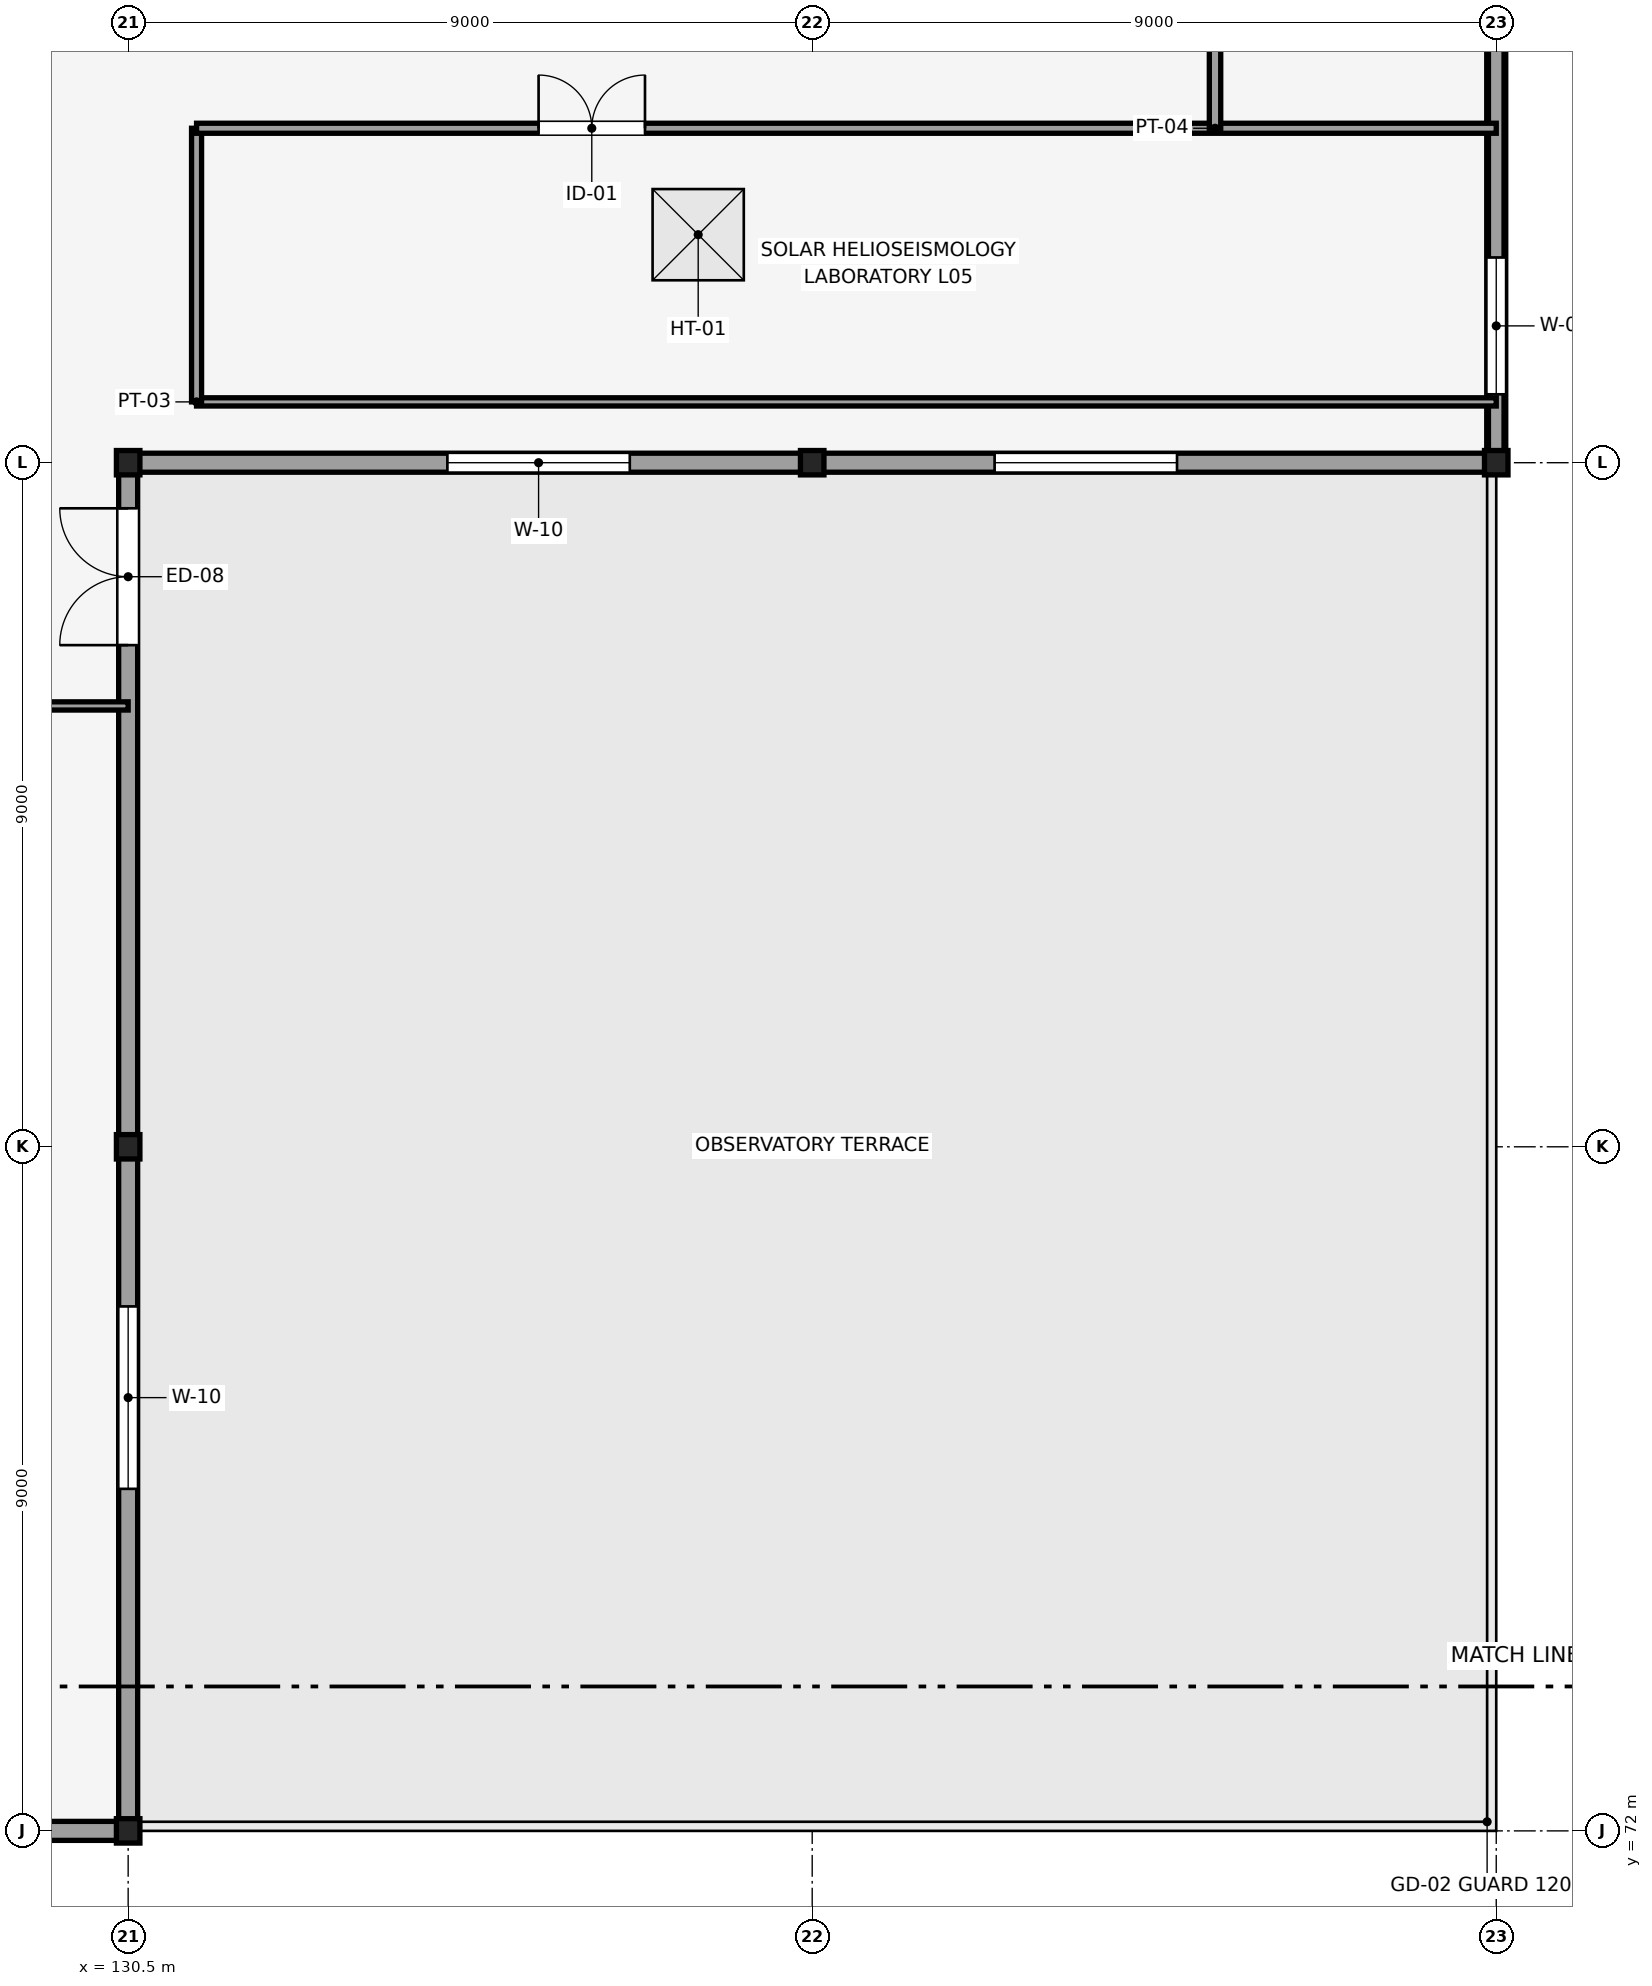
"""IFC4 building model, lengths in metres.
Left out: names, types, materials, properties, quantities, classifications, styles, units other than length and angle.
Written with IfcOpenShell. Run it as: python <this file> out.ifc"""

import sys

from ifc_helpers import new_model, si_unit, direction, frame, frame_2d, origin, origin_2d, place, context, subcontext, project, spatial, rectangle, i_section, extrude, element, fill, save


model = new_model("IFC4")
c1 = context("Model", 3, precision=1e-05, world=origin(), true_north=direction((0.0, 1.0)))
c2 = subcontext(c1, "Body", "Model", "MODEL_VIEW")
j1 = project(units=[si_unit("LENGTHUNIT", "METRE"), si_unit("PLANEANGLEUNIT", "RADIAN")], contexts=[c1])
p1 = place(None, origin())
s1 = spatial("IfcSite", under=j1, at=p1, CompositionType="ELEMENT")
p2 = place(p1, origin())
s2 = spatial("IfcBuilding", under=s1, at=p2, CompositionType="ELEMENT")
p3 = place(p2, frame((0.0, 0.0, 23.4)))
s3 = spatial("IfcBuildingStorey", under=s2, at=p3, CompositionType="ELEMENT", Elevation=23.4)
for number, where, z_axis, x_axis in (
    (1, (130.5, 72.0, 0.0), (0.0, 0.0, 1.0), (1.0, 0.0, 0.0)),
    (2, (130.5, 81.0, 0.0), (0.0, 0.0, 1.0), (1.0, 0.0, 0.0)),
    (3, (130.5, 90.0, 0.0), (0.0, 0.0, 1.0), (1.0, 0.0, 0.0)),
    (4, (139.5, 90.0, 0.0), (0.0, 0.0, 1.0), (1.0, 0.0, 0.0)),
    (5, (148.5, 90.0, 0.0), (0.0, 0.0, 1.0), (1.0, 0.0, 0.0)),
):
    element("IfcColumn", number, at=place(p3, frame(where, z_axis=z_axis, x_axis=x_axis)), inside=s3, PredefinedType="COLUMN", context=c2, shape_type="SweptSolid", body=[
        extrude(i_section(OverallWidth=0.309, OverallDepth=0.321, WebThickness=0.014, FlangeThickness=0.022, FilletRadius=0.017, at=origin_2d()), origin(), (0.0, 0.0, 1.0), 2.55),
    ])
p4 = place(p3, frame((121.5, 72.0, 0.0), z_axis=(0.0, 0.0, 1.0), x_axis=(1.0, 0.0, 0.0)))
e6 = element("IfcWall", 6, at=p4, inside=s3, PredefinedType="STANDARD", context=c2, shape_type="SweptSolid", body=[
    extrude(rectangle(XDim=9.0, YDim=0.25, at=frame_2d((4.5, 0.0))), origin(), (0.0, 0.0, 1.0), 2.114),
])
p5 = place(p4, frame((3.3, 0.0, 0.35)))
e7 = element("IfcOpeningElement", 7, at=p5, cuts=e6, PredefinedType="OPENING", context=c2, shape_type="SweptSolid", body=[
    extrude(rectangle(XDim=2.4, YDim=1.5, at=frame_2d((1.2, 0.75))), frame((0.0, 0.135, 0.0), z_axis=(0.0, -1.0, 0.0), x_axis=(1.0, 0.0, 0.0)), (0.0, 0.0, 1.0), 0.27),
])
p6 = place(p3, frame((130.5, 72.0, 0.0), z_axis=(0.0, 0.0, 1.0), x_axis=(0.0, 1.0, 0.0)))
e8 = element("IfcWall", 8, at=p6, inside=s3, PredefinedType="STANDARD", context=c2, shape_type="SweptSolid", body=[
    extrude(rectangle(XDim=18.0, YDim=0.25, at=frame_2d((9.0, 0.0))), origin(), (0.0, 0.0, 1.0), 2.114),
])
p7 = place(p6, frame((4.5, 0.0, 0.25)))
e9 = element("IfcOpeningElement", 9, at=p7, cuts=e8, PredefinedType="OPENING", context=c2, shape_type="SweptSolid", body=[
    extrude(rectangle(XDim=2.4, YDim=1.5, at=frame_2d((1.2, 0.75))), frame((0.0, 0.135, 0.0), z_axis=(0.0, -1.0, 0.0), x_axis=(1.0, 0.0, 0.0)), (0.0, 0.0, 1.0), 0.27),
])
p8 = place(p6, frame((15.6, 0.0, 0.0)))
e10 = element("IfcOpeningElement", 10, at=p8, cuts=e8, PredefinedType="OPENING", context=c2, shape_type="SweptSolid", body=[
    extrude(rectangle(XDim=1.8, YDim=2.05, at=frame_2d((0.9, 1.025))), frame((0.0, 0.135, 0.0), z_axis=(0.0, -1.0, 0.0), x_axis=(1.0, 0.0, 0.0)), (0.0, 0.0, 1.0), 0.27),
])
p9 = place(p3, frame((130.5, 90.0, 0.0), z_axis=(0.0, 0.0, 1.0), x_axis=(1.0, 0.0, 0.0)))
e11 = element("IfcWall", 11, at=p9, inside=s3, PredefinedType="STANDARD", context=c2, shape_type="SweptSolid", body=[
    extrude(rectangle(XDim=18.0, YDim=0.25, at=frame_2d((9.0, 0.0))), origin(), (0.0, 0.0, 1.0), 2.114),
])
p10 = place(p9, frame((4.2, 0.0, 0.35)))
e12 = element("IfcOpeningElement", 12, at=p10, cuts=e11, PredefinedType="OPENING", context=c2, shape_type="SweptSolid", body=[
    extrude(rectangle(XDim=2.4, YDim=1.5, at=frame_2d((1.2, 0.75))), frame((0.0, 0.135, 0.0), z_axis=(0.0, -1.0, 0.0), x_axis=(1.0, 0.0, 0.0)), (0.0, 0.0, 1.0), 0.27),
])
p11 = place(p9, frame((11.4, 0.0, 0.35)))
e13 = element("IfcOpeningElement", 13, at=p11, cuts=e11, PredefinedType="OPENING", context=c2, shape_type="SweptSolid", body=[
    extrude(rectangle(XDim=2.4, YDim=1.5, at=frame_2d((1.2, 0.75))), frame((0.0, 0.135, 0.0), z_axis=(0.0, -1.0, 0.0), x_axis=(1.0, 0.0, 0.0)), (0.0, 0.0, 1.0), 0.27),
])
p12 = place(p3, frame((148.5, 90.0, 0.0), z_axis=(0.0, 0.0, 1.0), x_axis=(0.0, 1.0, 0.0)))
e14 = element("IfcWall", 14, at=p12, inside=s3, PredefinedType="STANDARD", context=c2, shape_type="SweptSolid", body=[
    extrude(rectangle(XDim=9.0, YDim=0.25, at=frame_2d((4.5, 0.0))), origin(), (0.0, 0.0, 1.0), 2.114),
])
p13 = place(p12, frame((0.9, 0.0, 0.35)))
e15 = element("IfcOpeningElement", 15, at=p13, cuts=e14, PredefinedType="OPENING", context=c2, shape_type="SweptSolid", body=[
    extrude(rectangle(XDim=1.8, YDim=1.5, at=frame_2d((0.9, 0.75))), frame((0.0, 0.135, 0.0), z_axis=(0.0, -1.0, 0.0), x_axis=(1.0, 0.0, 0.0)), (0.0, 0.0, 1.0), 0.27),
])
p14 = place(p3, frame((148.5, 90.0, 2.55), z_axis=(0.0, 0.0, 1.0), x_axis=(0.0, 1.0, 0.0)))
e16 = element("IfcWall", 16, at=p14, inside=s3, PredefinedType="PARAPET", context=c2, shape_type="SweptSolid", body=[
    extrude(rectangle(XDim=18.0, YDim=0.205, at=frame_2d((9.0, 0.0))), origin(), (0.0, 0.0, 1.0), 0.4),
])
p15 = place(p3, frame((124.6, 86.8, 0.0), z_axis=(0.0, 0.0, 1.0), x_axis=(1.0, 0.0, 0.0)))
e17 = element("IfcWall", 17, at=p15, inside=s3, PredefinedType="PARTITIONING", context=c2, shape_type="SweptSolid", body=[
    extrude(rectangle(XDim=5.9, YDim=0.108, at=frame_2d((2.95, 0.0))), origin(), (0.0, 0.0, 1.0), 2.24),
])
p16 = place(p15, frame((1.95, 0.0, 0.0)))
e18 = element("IfcOpeningElement", 18, at=p16, cuts=e17, PredefinedType="OPENING", context=c2, shape_type="SweptSolid", body=[
    extrude(rectangle(XDim=2.0, YDim=2.4, at=frame_2d((1.0, 1.2))), frame((0.0, 0.064, 0.0), z_axis=(0.0, -1.0, 0.0), x_axis=(1.0, 0.0, 0.0)), (0.0, 0.0, 1.0), 0.128),
])
p17 = place(p3, frame((131.4, 90.8, 0.0), z_axis=(0.0, 0.0, 1.0), x_axis=(1.0, 0.0, 0.0)))
e19 = element("IfcWall", 19, at=p17, inside=s3, PredefinedType="PARTITIONING", context=c2, shape_type="SweptSolid", body=[
    extrude(rectangle(XDim=17.1, YDim=0.108, at=frame_2d((8.55, 0.0))), origin(), (0.0, 0.0, 1.0), 2.24),
])
p18 = place(p3, frame((131.4, 90.8, 0.0), z_axis=(0.0, 0.0, 1.0), x_axis=(0.0, 1.0, 0.0)))
e20 = element("IfcWall", 20, at=p18, inside=s3, PredefinedType="PARTITIONING", context=c2, shape_type="SweptSolid", body=[
    extrude(rectangle(XDim=3.6, YDim=0.132, at=frame_2d((1.8, 0.0))), origin(), (0.0, 0.0, 1.0), 2.24),
])
p19 = place(p3, frame((131.4, 94.4, 0.0), z_axis=(0.0, 0.0, 1.0), x_axis=(1.0, 0.0, 0.0)))
e21 = element("IfcWall", 21, at=p19, inside=s3, PredefinedType="PARTITIONING", context=c2, shape_type="SweptSolid", body=[
    extrude(rectangle(XDim=17.1, YDim=0.132, at=frame_2d((8.55, 0.0))), origin(), (0.0, 0.0, 1.0), 2.24),
])
p20 = place(p19, frame((4.5, 0.0, 0.0)))
e22 = element("IfcOpeningElement", 22, at=p20, cuts=e21, PredefinedType="OPENING", context=c2, shape_type="SweptSolid", body=[
    extrude(rectangle(XDim=1.4, YDim=2.2, at=frame_2d((0.7, 1.1))), frame((0.0, 0.076, 0.0), z_axis=(0.0, -1.0, 0.0), x_axis=(1.0, 0.0, 0.0)), (0.0, 0.0, 1.0), 0.152),
])
p21 = place(p3, frame((144.8, 94.4, 0.0), z_axis=(0.0, 0.0, 1.0), x_axis=(0.0, 1.0, 0.0)))
e23 = element("IfcWall", 23, at=p21, inside=s3, PredefinedType="PARTITIONING", context=c2, shape_type="SweptSolid", body=[
    extrude(rectangle(XDim=2.2, YDim=0.15, at=frame_2d((1.1, 0.0))), origin(), (0.0, 0.0, 1.0), 2.24),
])
p22 = place(p7, origin())
e24 = element("IfcWindow", 24, at=p22, inside=s3, PartitioningType="SINGLE_PANEL", PredefinedType="WINDOW", context=c2, shape_type="SweptSolid", body=[
    extrude(rectangle(XDim=2.4, YDim=1.5, at=frame_2d((1.2, 0.75))), frame((0.0, 0.03, 0.0), z_axis=(0.0, -1.0, 0.0), x_axis=(1.0, 0.0, 0.0)), (0.0, 0.0, 1.0), 0.06),
])
fill(e9, e24)
p23 = place(p8, origin())
e25 = element("IfcDoor", 25, at=p23, inside=s3, OperationType="DOUBLE_DOOR_SINGLE_SWING", PredefinedType="DOOR", context=c2, shape_type="SweptSolid", body=[
    extrude(rectangle(XDim=1.8, YDim=2.05, at=frame_2d((0.9, 1.025))), frame((0.0, 0.025, 0.0), z_axis=(0.0, -1.0, 0.0), x_axis=(1.0, 0.0, 0.0)), (0.0, 0.0, 1.0), 0.05),
])
fill(e10, e25)
p24 = place(p10, origin())
e26 = element("IfcWindow", 26, at=p24, inside=s3, PartitioningType="SINGLE_PANEL", PredefinedType="WINDOW", context=c2, shape_type="SweptSolid", body=[
    extrude(rectangle(XDim=2.4, YDim=1.5, at=frame_2d((1.2, 0.75))), frame((0.0, 0.03, 0.0), z_axis=(0.0, -1.0, 0.0), x_axis=(1.0, 0.0, 0.0)), (0.0, 0.0, 1.0), 0.06),
])
fill(e12, e26)
p25 = place(p11, origin())
e27 = element("IfcWindow", 27, at=p25, inside=s3, PartitioningType="SINGLE_PANEL", PredefinedType="WINDOW", context=c2, shape_type="SweptSolid", body=[
    extrude(rectangle(XDim=2.4, YDim=1.5, at=frame_2d((1.2, 0.75))), frame((0.0, 0.03, 0.0), z_axis=(0.0, -1.0, 0.0), x_axis=(1.0, 0.0, 0.0)), (0.0, 0.0, 1.0), 0.06),
])
fill(e13, e27)
p26 = place(p13, origin())
e28 = element("IfcWindow", 28, at=p26, inside=s3, PartitioningType="SINGLE_PANEL", PredefinedType="WINDOW", context=c2, shape_type="SweptSolid", body=[
    extrude(rectangle(XDim=1.8, YDim=1.5, at=frame_2d((0.9, 0.75))), frame((0.0, 0.03, 0.0), z_axis=(0.0, -1.0, 0.0), x_axis=(1.0, 0.0, 0.0)), (0.0, 0.0, 1.0), 0.06),
])
fill(e15, e28)
p27 = place(p2, frame((0.0, 0.0, 25.95)))
p28 = place(p27, frame((0.0, 0.0, -0.16)))
p29 = place(p28, frame((138.0, 93.0, 0.0)))
p30 = place(p29, frame((0.0, 0.0, 0.11)))
e29 = element("IfcDoor", 29, at=p30, inside=s3, OperationType="SINGLE_SWING_LEFT", PredefinedType="TRAPDOOR", context=c2, shape_type="SweptSolid", body=[
    extrude(rectangle(XDim=1.2, YDim=1.2, at=origin_2d()), origin(), (0.0, 0.0, 1.0), 0.05),
])
p31 = place(p20, origin())
e30 = element("IfcDoor", 30, at=p31, inside=s3, OperationType="DOUBLE_DOOR_SINGLE_SWING", PredefinedType="DOOR", context=c2, shape_type="SweptSolid", body=[
    extrude(rectangle(XDim=1.4, YDim=2.2, at=frame_2d((0.7, 1.1))), frame((0.0, 0.025, 0.0), z_axis=(0.0, -1.0, 0.0), x_axis=(1.0, 0.0, 0.0)), (0.0, 0.0, 1.0), 0.05),
])
fill(e22, e30)
save(model, sys.argv[1])
